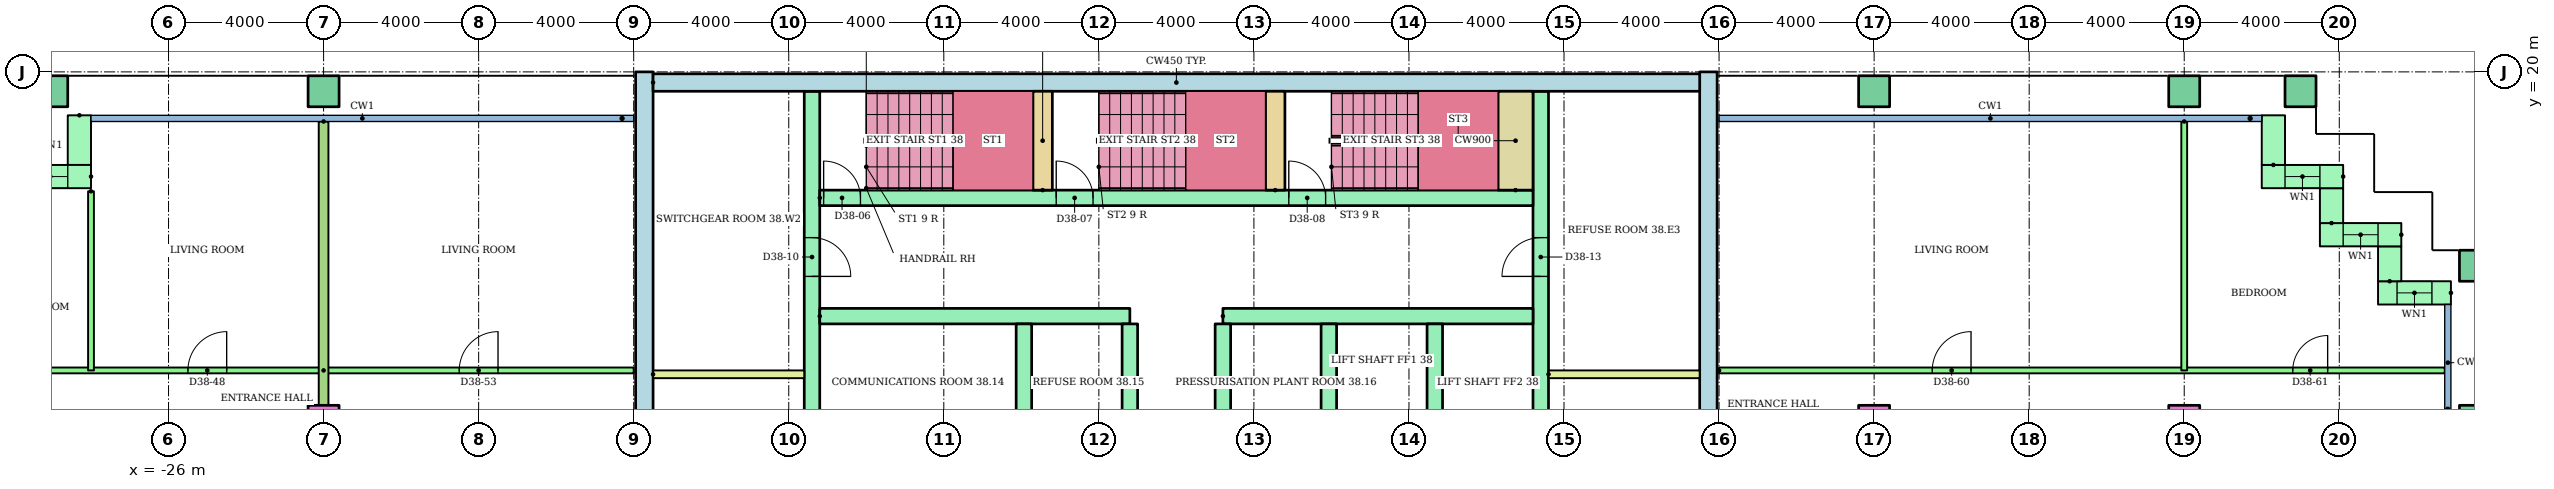
"""IFC4 building model, lengths in metres.
Left out: names, types, materials, properties, quantities, classifications, styles, units other than length and angle.
Written with IfcOpenShell. Run it as: python <this file> out.ifc"""

import sys

from ifc_helpers import new_model, si_unit, direction, frame, frame_2d, origin, origin_2d, place, context, subcontext, project, spatial, rectangle, hollow_rectangle, extrude, element, fill, save


model = new_model("IFC4")
c1 = context("Model", 3, precision=1e-05, world=origin(), true_north=direction((0.0, 1.0)))
c2 = subcontext(c1, "Body", "Model", "MODEL_VIEW")
j1 = project(units=[si_unit("LENGTHUNIT", "METRE"), si_unit("PLANEANGLEUNIT", "RADIAN")], contexts=[c1])
p1 = place(None, origin())
s1 = spatial("IfcSite", under=j1, at=p1, CompositionType="ELEMENT")
p2 = place(p1, origin())
s2 = spatial("IfcBuilding", under=s1, at=p2, CompositionType="ELEMENT")
p3 = place(p2, frame((0.0, 0.0, 145.4)))
s3 = spatial("IfcBuildingStorey", under=s2, at=p3, CompositionType="ELEMENT", Elevation=145.4)
for number, where in (
    (1, (-22.0, 11.0, 0.0)),
    (2, (18.0, 11.0, 0.0)),
    (3, (26.0, 11.0, 0.0)),
):
    element("IfcColumn", number, at=place(p3, frame(where)), inside=s3, PredefinedType="COLUMN", context=c2, shape_type="SweptSolid", body=[
        extrude(rectangle(XDim=0.8, YDim=0.8, at=origin_2d()), origin(), (0.0, 0.0, 1.0), 3.2),
    ])
for number, where in (
    (4, (33.5, 11.0, 0.0)),
    (5, (33.5, 15.0, 0.0)),
    (6, (-29.0, 19.5, 0.0)),
    (7, (-22.0, 19.5, 0.0)),
    (8, (18.0, 19.5, 0.0)),
    (9, (26.0, 19.5, 0.0)),
    (10, (29.0, 19.5, 0.0)),
):
    element("IfcColumn", number, at=place(p3, frame(where)), inside=s3, PredefinedType="COLUMN", context=c2, shape_type="SweptSolid", body=[
        extrude(hollow_rectangle(XDim=0.8, YDim=0.8, WallThickness=0.04, at=origin_2d()), origin(), (0.0, 0.0, 1.0), 3.2),
    ])
p4 = place(p3, frame((32.88, 14.3, 0.0), z_axis=(0.0, 0.0, 1.0), x_axis=(-1.0, 0.0, 0.0)))
e11 = element("IfcWall", 11, at=p4, inside=s3, PredefinedType="STANDARD", context=c2, shape_type="SweptSolid", body=[
    extrude(rectangle(XDim=1.88, YDim=0.6, at=frame_2d((0.94, 0.0))), origin(), (0.0, 0.0, 1.0), 2.92),
])
p5 = place(p4, frame((0.49, 0.0, 0.9)))
e12 = element("IfcOpeningElement", 12, at=p5, cuts=e11, PredefinedType="OPENING", context=c2, shape_type="SweptSolid", body=[
    extrude(rectangle(XDim=0.9, YDim=1.5, at=frame_2d((0.45, 0.75))), frame((0.0, 0.31, 0.0), z_axis=(0.0, -1.0, 0.0), x_axis=(1.0, 0.0, 0.0)), (0.0, 0.0, 1.0), 0.62),
])
p6 = place(p3, frame((31.3, 14.6, 0.0), z_axis=(0.0, 0.0, 1.0), x_axis=(0.0, 1.0, 0.0)))
e13 = element("IfcWall", 13, at=p6, inside=s3, PredefinedType="STANDARD", context=c2, shape_type="SweptSolid", body=[
    extrude(rectangle(XDim=0.9, YDim=0.6, at=frame_2d((0.45, 0.0))), origin(), (0.0, 0.0, 1.0), 2.92),
])
p7 = place(p3, frame((31.6, 15.8, 0.0), z_axis=(0.0, 0.0, 1.0), x_axis=(-1.0, 0.0, 0.0)))
e14 = element("IfcWall", 14, at=p7, inside=s3, PredefinedType="STANDARD", context=c2, shape_type="SweptSolid", body=[
    extrude(rectangle(XDim=2.1, YDim=0.6, at=frame_2d((1.05, 0.0))), origin(), (0.0, 0.0, 1.0), 2.92),
])
p8 = place(p7, frame((0.6, 0.0, 0.9)))
e15 = element("IfcOpeningElement", 15, at=p8, cuts=e14, PredefinedType="OPENING", context=c2, shape_type="SweptSolid", body=[
    extrude(rectangle(XDim=0.9, YDim=1.5, at=frame_2d((0.45, 0.75))), frame((0.0, 0.31, 0.0), z_axis=(0.0, -1.0, 0.0), x_axis=(1.0, 0.0, 0.0)), (0.0, 0.0, 1.0), 0.62),
])
p9 = place(p3, frame((29.8, 16.1, 0.0), z_axis=(0.0, 0.0, 1.0), x_axis=(0.0, 1.0, 0.0)))
e16 = element("IfcWall", 16, at=p9, inside=s3, PredefinedType="STANDARD", context=c2, shape_type="SweptSolid", body=[
    extrude(rectangle(XDim=0.9, YDim=0.6, at=frame_2d((0.45, 0.0))), origin(), (0.0, 0.0, 1.0), 2.92),
])
p10 = place(p3, frame((30.1, 17.3, 0.0), z_axis=(0.0, 0.0, 1.0), x_axis=(-1.0, 0.0, 0.0)))
e17 = element("IfcWall", 17, at=p10, inside=s3, PredefinedType="STANDARD", context=c2, shape_type="SweptSolid", body=[
    extrude(rectangle(XDim=2.1, YDim=0.6, at=frame_2d((1.05, 0.0))), origin(), (0.0, 0.0, 1.0), 2.92),
])
p11 = place(p10, frame((0.6, 0.0, 0.9)))
e18 = element("IfcOpeningElement", 18, at=p11, cuts=e17, PredefinedType="OPENING", context=c2, shape_type="SweptSolid", body=[
    extrude(rectangle(XDim=0.9, YDim=1.5, at=frame_2d((0.45, 0.75))), frame((0.0, 0.31, 0.0), z_axis=(0.0, -1.0, 0.0), x_axis=(1.0, 0.0, 0.0)), (0.0, 0.0, 1.0), 0.62),
])
for number, where, z_axis, x_axis in (
    (19, (28.3, 17.6, 0.0), (0.0, 0.0, 1.0), (0.0, 1.0, 0.0)),
    (20, (-28.3, 18.88, 0.0), (0.0, 0.0, 1.0), (0.0, -1.0, 0.0)),
):
    element("IfcWall", number, at=place(p3, frame(where, z_axis=z_axis, x_axis=x_axis)), inside=s3, PredefinedType="STANDARD", context=c2, shape_type="SweptSolid", body=[
        extrude(rectangle(XDim=1.28, YDim=0.6, at=frame_2d((0.64, 0.0))), origin(), (0.0, 0.0, 1.0), 2.92),
    ])
p12 = place(p3, frame((-28.0, 17.3, 0.0), z_axis=(0.0, 0.0, 1.0), x_axis=(-1.0, 0.0, 0.0)))
e21 = element("IfcWall", 21, at=p12, inside=s3, PredefinedType="STANDARD", context=c2, shape_type="SweptSolid", body=[
    extrude(rectangle(XDim=2.1, YDim=0.6, at=frame_2d((1.05, 0.0))), origin(), (0.0, 0.0, 1.0), 2.92),
])
p13 = place(p12, frame((0.6, 0.0, 0.9)))
e22 = element("IfcOpeningElement", 22, at=p13, cuts=e21, PredefinedType="OPENING", context=c2, shape_type="SweptSolid", body=[
    extrude(rectangle(XDim=0.9, YDim=1.5, at=frame_2d((0.45, 0.75))), frame((0.0, 0.31, 0.0), z_axis=(0.0, -1.0, 0.0), x_axis=(1.0, 0.0, 0.0)), (0.0, 0.0, 1.0), 0.62),
])
for number, where, z_axis, x_axis in (
    (23, (-13.725, 3.0, 0.0), (0.0, 0.0, 1.0), (0.0, 1.0, 0.0)),
    (24, (13.725, 3.0, 0.0), (0.0, 0.0, 1.0), (0.0, 1.0, 0.0)),
):
    element("IfcWall", number, at=place(p3, frame(where, z_axis=z_axis, x_axis=x_axis)), inside=s3, PredefinedType="SHEAR", context=c2, shape_type="SweptSolid", body=[
        extrude(rectangle(XDim=17.0, YDim=0.45, at=frame_2d((8.5, 0.0))), origin(), (0.0, 0.0, 1.0), 2.92),
    ])
p14 = place(p3, frame((-13.5, 19.725, 0.0)))
e25 = element("IfcWall", 25, at=p14, inside=s3, PredefinedType="SHEAR", context=c2, shape_type="SweptSolid", body=[
    extrude(rectangle(XDim=27.0, YDim=0.45, at=frame_2d((13.5, 0.0))), origin(), (0.0, 0.0, 1.0), 2.92),
])
p15 = place(p3, frame((-9.4, 6.8, 0.0), z_axis=(0.0, 0.0, 1.0), x_axis=(0.0, 1.0, 0.0)))
e26 = element("IfcWall", 26, at=p15, inside=s3, PredefinedType="SHEAR", context=c2, shape_type="SweptSolid", body=[
    extrude(rectangle(XDim=12.7, YDim=0.4, at=frame_2d((6.35, 0.0))), origin(), (0.0, 0.0, 1.0), 2.92),
])
p16 = place(p15, frame((1.15, 0.0, 0.0)))
e27 = element("IfcOpeningElement", 27, at=p16, cuts=e26, PredefinedType="OPENING", context=c2, shape_type="SweptSolid", body=[
    extrude(rectangle(XDim=1.0, YDim=2.1, at=frame_2d((0.5, 1.05))), frame((0.0, 0.21, 0.0), z_axis=(0.0, -1.0, 0.0), x_axis=(1.0, 0.0, 0.0)), (0.0, 0.0, 1.0), 0.42),
])
p17 = place(p15, frame((7.925, 0.0, 0.0)))
e28 = element("IfcOpeningElement", 28, at=p17, cuts=e26, PredefinedType="OPENING", context=c2, shape_type="SweptSolid", body=[
    extrude(rectangle(XDim=1.0, YDim=2.1, at=frame_2d((0.5, 1.05))), frame((0.0, 0.21, 0.0), z_axis=(0.0, -1.0, 0.0), x_axis=(1.0, 0.0, 0.0)), (0.0, 0.0, 1.0), 0.42),
])
p18 = place(p3, frame((9.4, 6.8, 0.0), z_axis=(0.0, 0.0, 1.0), x_axis=(0.0, 1.0, 0.0)))
e29 = element("IfcWall", 29, at=p18, inside=s3, PredefinedType="SHEAR", context=c2, shape_type="SweptSolid", body=[
    extrude(rectangle(XDim=12.7, YDim=0.4, at=frame_2d((6.35, 0.0))), origin(), (0.0, 0.0, 1.0), 2.92),
])
p19 = place(p18, frame((0.3, 0.0, 0.0)))
e30 = element("IfcOpeningElement", 30, at=p19, cuts=e29, PredefinedType="OPENING", context=c2, shape_type="SweptSolid", body=[
    extrude(rectangle(XDim=1.0, YDim=2.1, at=frame_2d((0.5, 1.05))), frame((0.0, 0.21, 0.0), z_axis=(0.0, -1.0, 0.0), x_axis=(1.0, 0.0, 0.0)), (0.0, 0.0, 1.0), 0.42),
])
p20 = place(p18, frame((2.05, 0.0, 0.0)))
e31 = element("IfcOpeningElement", 31, at=p20, cuts=e29, PredefinedType="OPENING", context=c2, shape_type="SweptSolid", body=[
    extrude(rectangle(XDim=1.0, YDim=2.1, at=frame_2d((0.5, 1.05))), frame((0.0, 0.21, 0.0), z_axis=(0.0, -1.0, 0.0), x_axis=(1.0, 0.0, 0.0)), (0.0, 0.0, 1.0), 0.42),
])
p21 = place(p18, frame((7.925, 0.0, 0.0)))
e32 = element("IfcOpeningElement", 32, at=p21, cuts=e29, PredefinedType="OPENING", context=c2, shape_type="SweptSolid", body=[
    extrude(rectangle(XDim=1.0, YDim=2.1, at=frame_2d((0.5, 1.05))), frame((0.0, 0.21, 0.0), z_axis=(0.0, -1.0, 0.0), x_axis=(1.0, 0.0, 0.0)), (0.0, 0.0, 1.0), 0.42),
])
for number, where in (
    (33, (-9.2, 13.7, 0.0)),
    (34, (1.2, 13.7, 0.0)),
):
    element("IfcWall", number, at=place(p3, frame(where)), inside=s3, PredefinedType="SHEAR", context=c2, shape_type="SweptSolid", body=[
        extrude(rectangle(XDim=8.0, YDim=0.4, at=frame_2d((4.0, 0.0))), origin(), (0.0, 0.0, 1.0), 2.92),
    ])
for number, where, z_axis, x_axis in (
    (35, (-3.933, 10.5, 0.0), (0.0, 0.0, 1.0), (0.0, 1.0, 0.0)),
    (36, (-1.2, 10.5, 0.0), (0.0, 0.0, 1.0), (0.0, 1.0, 0.0)),
    (37, (1.2, 10.5, 0.0), (0.0, 0.0, 1.0), (0.0, 1.0, 0.0)),
    (38, (3.933, 10.5, 0.0), (0.0, 0.0, 1.0), (0.0, 1.0, 0.0)),
    (39, (6.667, 10.5, 0.0), (0.0, 0.0, 1.0), (0.0, 1.0, 0.0)),
):
    element("IfcWall", number, at=place(p3, frame(where, z_axis=z_axis, x_axis=x_axis)), inside=s3, PredefinedType="SHEAR", context=c2, shape_type="SweptSolid", body=[
        extrude(rectangle(XDim=3.0, YDim=0.4, at=frame_2d((1.5, 0.0))), origin(), (0.0, 0.0, 1.0), 2.92),
    ])
p22 = place(p3, frame((-9.2, 16.75, 0.0)))
e40 = element("IfcWall", 40, at=p22, inside=s3, PredefinedType="SHEAR", context=c2, shape_type="SweptSolid", body=[
    extrude(rectangle(XDim=18.4, YDim=0.4, at=frame_2d((9.2, 0.0))), origin(), (0.0, 0.0, 1.0), 2.92),
])
p23 = place(p22, frame((0.1, 0.0, 0.0)))
e41 = element("IfcOpeningElement", 41, at=p23, cuts=e40, PredefinedType="OPENING", context=c2, shape_type="SweptSolid", body=[
    extrude(rectangle(XDim=0.95, YDim=2.1, at=frame_2d((0.475, 1.05))), frame((0.0, 0.21, 0.0), z_axis=(0.0, -1.0, 0.0), x_axis=(1.0, 0.0, 0.0)), (0.0, 0.0, 1.0), 0.42),
])
p24 = place(p22, frame((6.1, 0.0, 0.0)))
e42 = element("IfcOpeningElement", 42, at=p24, cuts=e40, PredefinedType="OPENING", context=c2, shape_type="SweptSolid", body=[
    extrude(rectangle(XDim=0.95, YDim=2.1, at=frame_2d((0.475, 1.05))), frame((0.0, 0.21, 0.0), z_axis=(0.0, -1.0, 0.0), x_axis=(1.0, 0.0, 0.0)), (0.0, 0.0, 1.0), 0.42),
])
p25 = place(p22, frame((12.1, 0.0, 0.0)))
e43 = element("IfcOpeningElement", 43, at=p25, cuts=e40, PredefinedType="OPENING", context=c2, shape_type="SweptSolid", body=[
    extrude(rectangle(XDim=0.95, YDim=2.1, at=frame_2d((0.475, 1.05))), frame((0.0, 0.21, 0.0), z_axis=(0.0, -1.0, 0.0), x_axis=(1.0, 0.0, 0.0)), (0.0, 0.0, 1.0), 0.42),
])
for number, where, z_axis, x_axis in (
    (44, (-3.45, 16.95, 0.0), (0.0, 0.0, 1.0), (0.0, 1.0, 0.0)),
    (45, (2.55, 16.95, 0.0), (0.0, 0.0, 1.0), (0.0, 1.0, 0.0)),
):
    element("IfcWall", number, at=place(p3, frame(where, z_axis=z_axis, x_axis=x_axis)), inside=s3, PredefinedType="SHEAR", context=c2, shape_type="SweptSolid", body=[
        extrude(rectangle(XDim=2.55, YDim=0.5, at=frame_2d((1.275, 0.0))), origin(), (0.0, 0.0, 1.0), 2.92),
    ])
p26 = place(p3, frame((8.75, 16.95, 0.0), z_axis=(0.0, 0.0, 1.0), x_axis=(0.0, 1.0, 0.0)))
e46 = element("IfcWall", 46, at=p26, inside=s3, PredefinedType="SHEAR", context=c2, shape_type="SweptSolid", body=[
    extrude(rectangle(XDim=2.55, YDim=0.9, at=frame_2d((1.275, 0.0))), origin(), (0.0, 0.0, 1.0), 2.92),
])
for number, where in (
    (47, (-13.5, 12.2, 0.0)),
    (48, (9.6, 12.2, 0.0)),
):
    element("IfcWall", number, at=place(p3, frame(where)), inside=s3, PredefinedType="PARTITIONING", context=c2, shape_type="SweptSolid", body=[
        extrude(rectangle(XDim=3.9, YDim=0.2, at=frame_2d((1.95, 0.0))), origin(), (0.0, 0.0, 1.0), 2.92),
    ])
p27 = place(p3, frame((-32.72, 12.3, 0.0)))
e49 = element("IfcWall", 49, at=p27, inside=s3, PredefinedType="PARTITIONING", context=c2, shape_type="SweptSolid", body=[
    extrude(rectangle(XDim=10.72, YDim=0.15, at=frame_2d((5.36, 0.0))), origin(), (0.0, 0.0, 1.0), 2.4),
])
p28 = place(p27, frame((1.102, 0.0, 0.0)))
e50 = element("IfcOpeningElement", 50, at=p28, cuts=e49, PredefinedType="OPENING", context=c2, shape_type="SweptSolid", body=[
    extrude(rectangle(XDim=1.0, YDim=2.1, at=frame_2d((0.5, 1.05))), frame((0.0, 0.085, 0.0), z_axis=(0.0, -1.0, 0.0), x_axis=(1.0, 0.0, 0.0)), (0.0, 0.0, 1.0), 0.17),
])
p29 = place(p27, frame((7.22, 0.0, 0.0)))
e51 = element("IfcOpeningElement", 51, at=p29, cuts=e49, PredefinedType="OPENING", context=c2, shape_type="SweptSolid", body=[
    extrude(rectangle(XDim=1.0, YDim=2.1, at=frame_2d((0.5, 1.05))), frame((0.0, 0.085, 0.0), z_axis=(0.0, -1.0, 0.0), x_axis=(1.0, 0.0, 0.0)), (0.0, 0.0, 1.0), 0.17),
])
p30 = place(p3, frame((-28.0, 16.92, 0.0), z_axis=(0.0, 0.0, 1.0), x_axis=(0.0, -1.0, 0.0)))
e52 = element("IfcWall", 52, at=p30, inside=s3, PredefinedType="PARTITIONING", context=c2, shape_type="SweptSolid", body=[
    extrude(rectangle(XDim=4.62, YDim=0.15, at=frame_2d((2.31, 0.0))), origin(), (0.0, 0.0, 1.0), 2.4),
])
p31 = place(p3, frame((-22.0, 12.3, 0.0)))
e53 = element("IfcWall", 53, at=p31, inside=s3, PredefinedType="PARTITIONING", context=c2, shape_type="SweptSolid", body=[
    extrude(rectangle(XDim=8.0, YDim=0.15, at=frame_2d((4.0, 0.0))), origin(), (0.0, 0.0, 1.0), 2.4),
])
p32 = place(p31, frame((3.5, 0.0, 0.0)))
e54 = element("IfcOpeningElement", 54, at=p32, cuts=e53, PredefinedType="OPENING", context=c2, shape_type="SweptSolid", body=[
    extrude(rectangle(XDim=1.0, YDim=2.1, at=frame_2d((0.5, 1.05))), frame((0.0, 0.085, 0.0), z_axis=(0.0, -1.0, 0.0), x_axis=(1.0, 0.0, 0.0)), (0.0, 0.0, 1.0), 0.17),
])
p33 = place(p3, frame((-22.0, 18.721, 0.0), z_axis=(0.0, 0.0, 1.0), x_axis=(0.0, -1.0, 0.0)))
e55 = element("IfcWall", 55, at=p33, inside=s3, PredefinedType="PARTITIONING", context=c2, shape_type="SweptSolid", body=[
    extrude(rectangle(XDim=17.321, YDim=0.25, at=frame_2d((8.661, 0.0))), origin(), (0.0, 0.0, 1.0), 2.4),
])
p34 = place(p3, frame((14.0, 12.3, 0.0)))
e56 = element("IfcWall", 56, at=p34, inside=s3, PredefinedType="PARTITIONING", context=c2, shape_type="SweptSolid", body=[
    extrude(rectangle(XDim=18.72, YDim=0.15, at=frame_2d((9.36, 0.0))), origin(), (0.0, 0.0, 1.0), 2.4),
])
p35 = place(p34, frame((5.5, 0.0, 0.0)))
e57 = element("IfcOpeningElement", 57, at=p35, cuts=e56, PredefinedType="OPENING", context=c2, shape_type="SweptSolid", body=[
    extrude(rectangle(XDim=1.0, YDim=2.1, at=frame_2d((0.5, 1.05))), frame((0.0, 0.085, 0.0), z_axis=(0.0, -1.0, 0.0), x_axis=(1.0, 0.0, 0.0)), (0.0, 0.0, 1.0), 0.17),
])
p36 = place(p34, frame((14.8, 0.0, 0.0)))
e58 = element("IfcOpeningElement", 58, at=p36, cuts=e56, PredefinedType="OPENING", context=c2, shape_type="SweptSolid", body=[
    extrude(rectangle(XDim=0.9, YDim=2.1, at=frame_2d((0.45, 1.05))), frame((0.0, 0.085, 0.0), z_axis=(0.0, -1.0, 0.0), x_axis=(1.0, 0.0, 0.0)), (0.0, 0.0, 1.0), 0.17),
])
p37 = place(p3, frame((26.0, 18.721, 0.0), z_axis=(0.0, 0.0, 1.0), x_axis=(0.0, -1.0, 0.0)))
e59 = element("IfcWall", 59, at=p37, inside=s3, PredefinedType="PARTITIONING", context=c2, shape_type="SweptSolid", body=[
    extrude(rectangle(XDim=6.421, YDim=0.15, at=frame_2d((3.21, 0.0))), origin(), (0.0, 0.0, 1.0), 2.4),
])
p38 = place(p5, origin())
e60 = element("IfcWindow", 60, at=p38, inside=s3, PartitioningType="SINGLE_PANEL", PredefinedType="WINDOW", context=c2, shape_type="SweptSolid", body=[
    extrude(rectangle(XDim=0.9, YDim=1.5, at=frame_2d((0.45, 0.75))), frame((0.0, 0.03, 0.0), z_axis=(0.0, -1.0, 0.0), x_axis=(1.0, 0.0, 0.0)), (0.0, 0.0, 1.0), 0.06),
])
fill(e12, e60)
p39 = place(p8, origin())
e61 = element("IfcWindow", 61, at=p39, inside=s3, PartitioningType="SINGLE_PANEL", PredefinedType="WINDOW", context=c2, shape_type="SweptSolid", body=[
    extrude(rectangle(XDim=0.9, YDim=1.5, at=frame_2d((0.45, 0.75))), frame((0.0, 0.03, 0.0), z_axis=(0.0, -1.0, 0.0), x_axis=(1.0, 0.0, 0.0)), (0.0, 0.0, 1.0), 0.06),
])
fill(e15, e61)
p40 = place(p11, origin())
e62 = element("IfcWindow", 62, at=p40, inside=s3, PartitioningType="SINGLE_PANEL", PredefinedType="WINDOW", context=c2, shape_type="SweptSolid", body=[
    extrude(rectangle(XDim=0.9, YDim=1.5, at=frame_2d((0.45, 0.75))), frame((0.0, 0.03, 0.0), z_axis=(0.0, -1.0, 0.0), x_axis=(1.0, 0.0, 0.0)), (0.0, 0.0, 1.0), 0.06),
])
fill(e18, e62)
p41 = place(p13, origin())
e63 = element("IfcWindow", 63, at=p41, inside=s3, PartitioningType="SINGLE_PANEL", PredefinedType="WINDOW", context=c2, shape_type="SweptSolid", body=[
    extrude(rectangle(XDim=0.9, YDim=1.5, at=frame_2d((0.45, 0.75))), frame((0.0, 0.03, 0.0), z_axis=(0.0, -1.0, 0.0), x_axis=(1.0, 0.0, 0.0)), (0.0, 0.0, 1.0), 0.06),
])
fill(e22, e63)
p42 = place(p23, origin())
e64 = element("IfcDoor", 64, at=p42, inside=s3, OperationType="SINGLE_SWING_LEFT", PredefinedType="DOOR", context=c2, shape_type="SweptSolid", body=[
    extrude(rectangle(XDim=0.95, YDim=2.1, at=frame_2d((0.475, 1.05))), frame((0.0, 0.025, 0.0), z_axis=(0.0, -1.0, 0.0), x_axis=(1.0, 0.0, 0.0)), (0.0, 0.0, 1.0), 0.05),
])
fill(e41, e64)
p43 = place(p24, origin())
e65 = element("IfcDoor", 65, at=p43, inside=s3, OperationType="SINGLE_SWING_LEFT", PredefinedType="DOOR", context=c2, shape_type="SweptSolid", body=[
    extrude(rectangle(XDim=0.95, YDim=2.1, at=frame_2d((0.475, 1.05))), frame((0.0, 0.025, 0.0), z_axis=(0.0, -1.0, 0.0), x_axis=(1.0, 0.0, 0.0)), (0.0, 0.0, 1.0), 0.05),
])
fill(e42, e65)
p44 = place(p25, origin())
e66 = element("IfcDoor", 66, at=p44, inside=s3, OperationType="SINGLE_SWING_LEFT", PredefinedType="DOOR", context=c2, shape_type="SweptSolid", body=[
    extrude(rectangle(XDim=0.95, YDim=2.1, at=frame_2d((0.475, 1.05))), frame((0.0, 0.025, 0.0), z_axis=(0.0, -1.0, 0.0), x_axis=(1.0, 0.0, 0.0)), (0.0, 0.0, 1.0), 0.05),
])
fill(e43, e66)
p45 = place(p17, frame((1.0, 0.0, 0.0), z_axis=(0.0, 0.0, 1.0), x_axis=(-1.0, 0.0, 0.0)))
e67 = element("IfcDoor", 67, at=p45, inside=s3, OperationType="SINGLE_SWING_LEFT", PredefinedType="DOOR", context=c2, shape_type="SweptSolid", body=[
    extrude(rectangle(XDim=1.0, YDim=2.1, at=frame_2d((0.5, 1.05))), frame((0.0, 0.025, 0.0), z_axis=(0.0, -1.0, 0.0), x_axis=(1.0, 0.0, 0.0)), (0.0, 0.0, 1.0), 0.05),
])
fill(e28, e67)
p46 = place(p21, origin())
e68 = element("IfcDoor", 68, at=p46, inside=s3, OperationType="SINGLE_SWING_LEFT", PredefinedType="DOOR", context=c2, shape_type="SweptSolid", body=[
    extrude(rectangle(XDim=1.0, YDim=2.1, at=frame_2d((0.5, 1.05))), frame((0.0, 0.025, 0.0), z_axis=(0.0, -1.0, 0.0), x_axis=(1.0, 0.0, 0.0)), (0.0, 0.0, 1.0), 0.05),
])
fill(e32, e68)
p47 = place(p29, origin())
e69 = element("IfcDoor", 69, at=p47, inside=s3, OperationType="SINGLE_SWING_RIGHT", PredefinedType="DOOR", context=c2, shape_type="SweptSolid", body=[
    extrude(rectangle(XDim=1.0, YDim=2.1, at=frame_2d((0.5, 1.05))), frame((0.0, 0.025, 0.0), z_axis=(0.0, -1.0, 0.0), x_axis=(1.0, 0.0, 0.0)), (0.0, 0.0, 1.0), 0.05),
])
fill(e51, e69)
p48 = place(p32, origin())
e70 = element("IfcDoor", 70, at=p48, inside=s3, OperationType="SINGLE_SWING_RIGHT", PredefinedType="DOOR", context=c2, shape_type="SweptSolid", body=[
    extrude(rectangle(XDim=1.0, YDim=2.1, at=frame_2d((0.5, 1.05))), frame((0.0, 0.025, 0.0), z_axis=(0.0, -1.0, 0.0), x_axis=(1.0, 0.0, 0.0)), (0.0, 0.0, 1.0), 0.05),
])
fill(e54, e70)
p49 = place(p35, origin())
e71 = element("IfcDoor", 71, at=p49, inside=s3, OperationType="SINGLE_SWING_RIGHT", PredefinedType="DOOR", context=c2, shape_type="SweptSolid", body=[
    extrude(rectangle(XDim=1.0, YDim=2.1, at=frame_2d((0.5, 1.05))), frame((0.0, 0.025, 0.0), z_axis=(0.0, -1.0, 0.0), x_axis=(1.0, 0.0, 0.0)), (0.0, 0.0, 1.0), 0.05),
])
fill(e57, e71)
p50 = place(p36, origin())
e72 = element("IfcDoor", 72, at=p50, inside=s3, OperationType="SINGLE_SWING_RIGHT", PredefinedType="DOOR", context=c2, shape_type="SweptSolid", body=[
    extrude(rectangle(XDim=0.9, YDim=2.1, at=frame_2d((0.45, 1.05))), frame((0.0, 0.025, 0.0), z_axis=(0.0, -1.0, 0.0), x_axis=(1.0, 0.0, 0.0)), (0.0, 0.0, 1.0), 0.05),
])
fill(e58, e72)
save(model, sys.argv[1])
